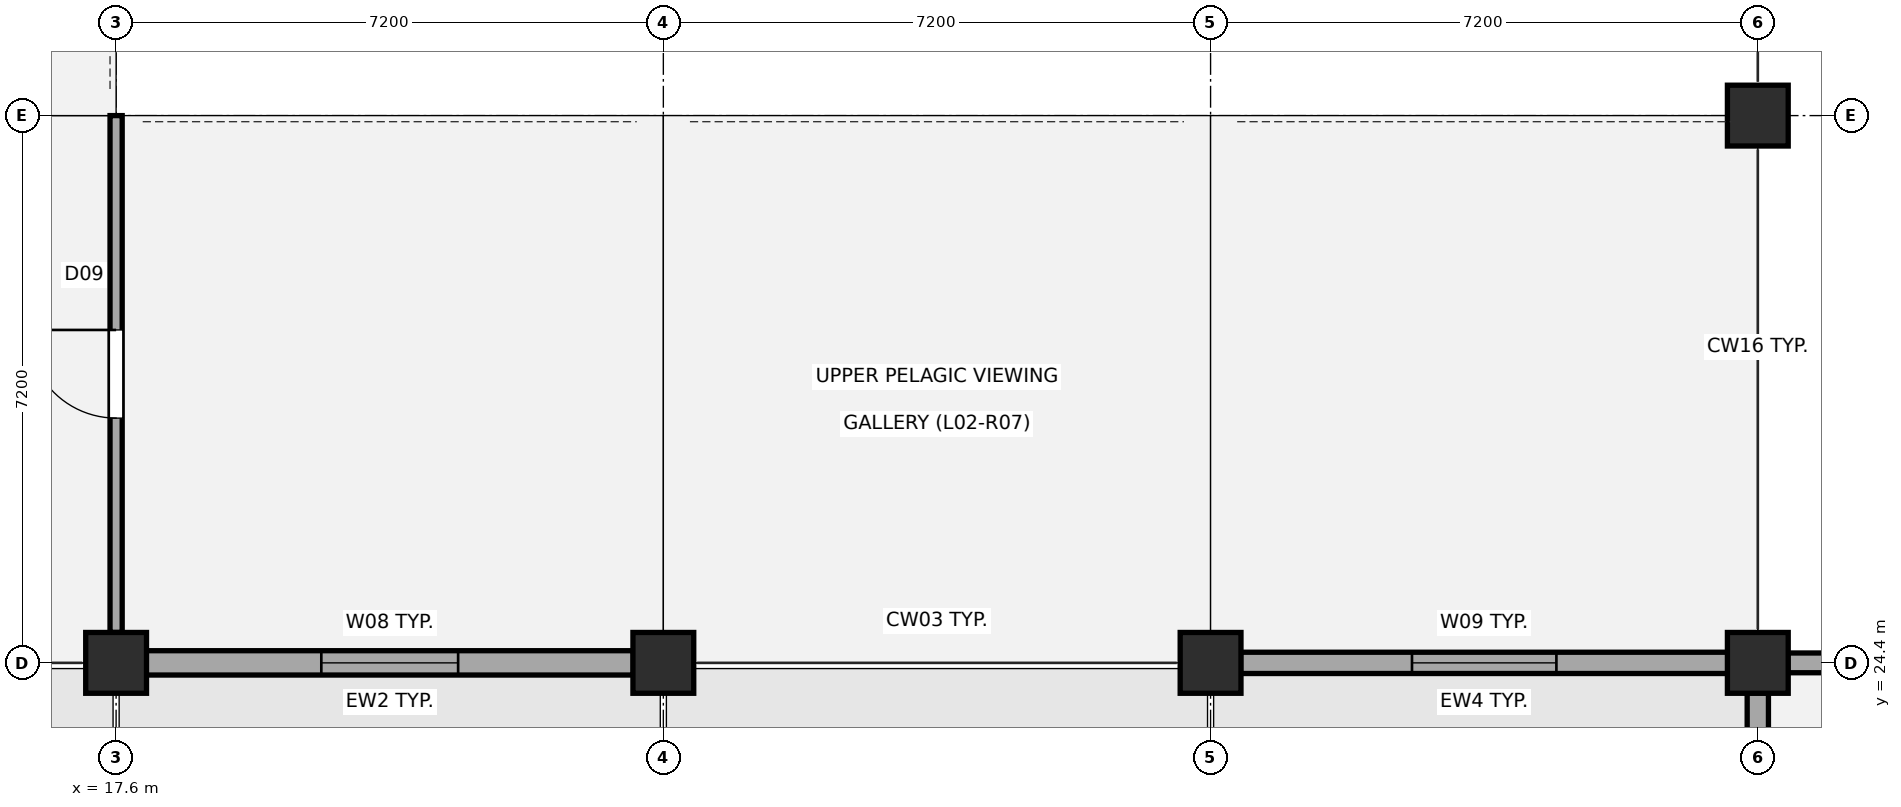
"""IFC4 building model, lengths in metres.
Left out: names, types, materials, properties, quantities, classifications, styles, units other than length and angle.
Written with IfcOpenShell. Run it as: python <this file> out.ifc"""

import sys

from ifc_helpers import new_model, si_unit, direction, frame, frame_2d, origin, origin_2d, place, context, subcontext, project, spatial, rectangle, extrude, element, fill, save


model = new_model("IFC4")
c1 = context("Model", 3, precision=1e-05, world=origin(), true_north=direction((0.0, 1.0)))
c2 = subcontext(c1, "Body", "Model", "MODEL_VIEW")
j1 = project(units=[si_unit("LENGTHUNIT", "METRE"), si_unit("PLANEANGLEUNIT", "RADIAN")], contexts=[c1])
p1 = place(None, origin())
s1 = spatial("IfcSite", under=j1, at=p1, CompositionType="ELEMENT")
p2 = place(p1, origin())
s2 = spatial("IfcBuilding", under=s1, at=p2, CompositionType="ELEMENT")
p3 = place(p2, frame((0.0, 0.0, 9.18)))
s3 = spatial("IfcBuildingStorey", under=s2, at=p3, CompositionType="ELEMENT", Elevation=9.18)
for number, where, z_axis, x_axis in (
    (1, (17.6, 24.4, 0.0), (0.0, 0.0, 1.0), (1.0, 0.0, 0.0)),
    (2, (24.8, 24.4, 0.0), (0.0, 0.0, 1.0), (1.0, 0.0, 0.0)),
    (3, (32.0, 24.4, 0.0), (0.0, 0.0, 1.0), (1.0, 0.0, 0.0)),
    (4, (39.2, 24.4, 0.0), (0.0, 0.0, 1.0), (1.0, 0.0, 0.0)),
    (5, (39.2, 31.6, 0.0), (0.0, 0.0, 1.0), (1.0, 0.0, 0.0)),
):
    element("IfcColumn", number, at=place(p3, frame(where, z_axis=z_axis, x_axis=x_axis)), inside=s3, PredefinedType="COLUMN", context=c2, shape_type="SweptSolid", body=[
        extrude(rectangle(XDim=0.8, YDim=0.8, at=origin_2d()), origin(), (0.0, 0.0, 1.0), 4.32),
    ])
p4 = place(p3, frame((24.405, 24.4, 0.0), z_axis=(0.0, 0.0, 1.0), x_axis=(-1.0, 0.0, 0.0)))
e6 = element("IfcWall", 6, at=p4, inside=s3, PredefinedType="STANDARD", context=c2, shape_type="SweptSolid", body=[
    extrude(rectangle(XDim=6.41, YDim=0.32, at=frame_2d((3.205, 0.0))), origin(), (0.0, 0.0, 1.0), 4.02),
])
p5 = place(p4, frame((2.305, 0.0, 0.95)))
e7 = element("IfcOpeningElement", 7, at=p5, cuts=e6, PredefinedType="OPENING", context=c2, shape_type="SweptSolid", body=[
    extrude(rectangle(XDim=1.8, YDim=1.8, at=frame_2d((0.9, 0.9))), frame((0.0, 0.17, 0.0), z_axis=(0.0, -1.0, 0.0), x_axis=(1.0, 0.0, 0.0)), (0.0, 0.0, 1.0), 0.34),
])
p6 = place(p3, frame((38.805, 24.4, 0.0), z_axis=(0.0, 0.0, 1.0), x_axis=(-1.0, 0.0, 0.0)))
e8 = element("IfcWall", 8, at=p6, inside=s3, PredefinedType="STANDARD", context=c2, shape_type="SweptSolid", body=[
    extrude(rectangle(XDim=6.41, YDim=0.28, at=frame_2d((3.205, 0.0))), origin(), (0.0, 0.0, 1.0), 4.02),
])
p7 = place(p6, frame((2.255, 0.0, 0.95)))
e9 = element("IfcOpeningElement", 9, at=p7, cuts=e8, PredefinedType="OPENING", context=c2, shape_type="SweptSolid", body=[
    extrude(rectangle(XDim=1.9, YDim=1.85, at=frame_2d((0.95, 0.925))), frame((0.0, 0.15, 0.0), z_axis=(0.0, -1.0, 0.0), x_axis=(1.0, 0.0, 0.0)), (0.0, 0.0, 1.0), 0.3),
])
p8 = place(p3, frame((39.595, 24.4, 0.0), z_axis=(0.0, 0.0, 1.0), x_axis=(1.0, 0.0, 0.0)))
e10 = element("IfcWall", 10, at=p8, inside=s3, PredefinedType="STANDARD", context=c2, shape_type="SweptSolid", body=[
    extrude(rectangle(XDim=6.41, YDim=0.26, at=frame_2d((3.205, 0.0))), origin(), (0.0, 0.0, 1.0), 3.48),
])
p9 = place(p3, frame((39.2, 17.595, 0.0), z_axis=(0.0, 0.0, 1.0), x_axis=(0.0, 1.0, 0.0)))
e11 = element("IfcWall", 11, at=p9, inside=s3, PredefinedType="STANDARD", context=c2, shape_type="SweptSolid", body=[
    extrude(rectangle(XDim=6.41, YDim=0.28, at=frame_2d((3.205, 0.0))), origin(), (0.0, 0.0, 1.0), 3.48),
])
p10 = place(p3, frame((17.6, 24.8, 0.0), z_axis=(0.0, 0.0, 1.0), x_axis=(0.0, 1.0, 0.0)))
e12 = element("IfcWall", 12, at=p10, inside=s3, PredefinedType="PARTITIONING", context=c2, shape_type="SweptSolid", body=[
    extrude(rectangle(XDim=6.8, YDim=0.16, at=frame_2d((3.4, 0.0))), origin(), (0.0, 0.0, 1.0), 4.0),
])
p11 = place(p10, frame((2.82, 0.0, 0.0)))
e13 = element("IfcOpeningElement", 13, at=p11, cuts=e12, PredefinedType="OPENING", context=c2, shape_type="SweptSolid", body=[
    extrude(rectangle(XDim=1.16, YDim=2.18, at=frame_2d((0.58, 1.09))), frame((0.0, 0.09, 0.0), z_axis=(0.0, -1.0, 0.0), x_axis=(1.0, 0.0, 0.0)), (0.0, 0.0, 1.0), 0.18),
])
p12 = place(p5, origin())
e14 = element("IfcWindow", 14, at=p12, inside=s3, PartitioningType="SINGLE_PANEL", PredefinedType="WINDOW", context=c2, shape_type="SweptSolid", body=[
    extrude(rectangle(XDim=1.8, YDim=1.8, at=frame_2d((0.9, 0.9))), frame((0.0, 0.03, 0.0), z_axis=(0.0, -1.0, 0.0), x_axis=(1.0, 0.0, 0.0)), (0.0, 0.0, 1.0), 0.06),
])
fill(e7, e14)
p13 = place(p7, origin())
e15 = element("IfcWindow", 15, at=p13, inside=s3, PartitioningType="SINGLE_PANEL", PredefinedType="WINDOW", context=c2, shape_type="SweptSolid", body=[
    extrude(rectangle(XDim=1.9, YDim=1.85, at=frame_2d((0.95, 0.925))), frame((0.0, 0.03, 0.0), z_axis=(0.0, -1.0, 0.0), x_axis=(1.0, 0.0, 0.0)), (0.0, 0.0, 1.0), 0.06),
])
fill(e9, e15)
p14 = place(p11, origin())
e16 = element("IfcDoor", 16, at=p14, inside=s3, OperationType="SINGLE_SWING_RIGHT", PredefinedType="DOOR", context=c2, shape_type="SweptSolid", body=[
    extrude(rectangle(XDim=1.16, YDim=2.18, at=frame_2d((0.58, 1.09))), frame((0.0, 0.025, 0.0), z_axis=(0.0, -1.0, 0.0), x_axis=(1.0, 0.0, 0.0)), (0.0, 0.0, 1.0), 0.05),
])
fill(e13, e16)
save(model, sys.argv[1])
